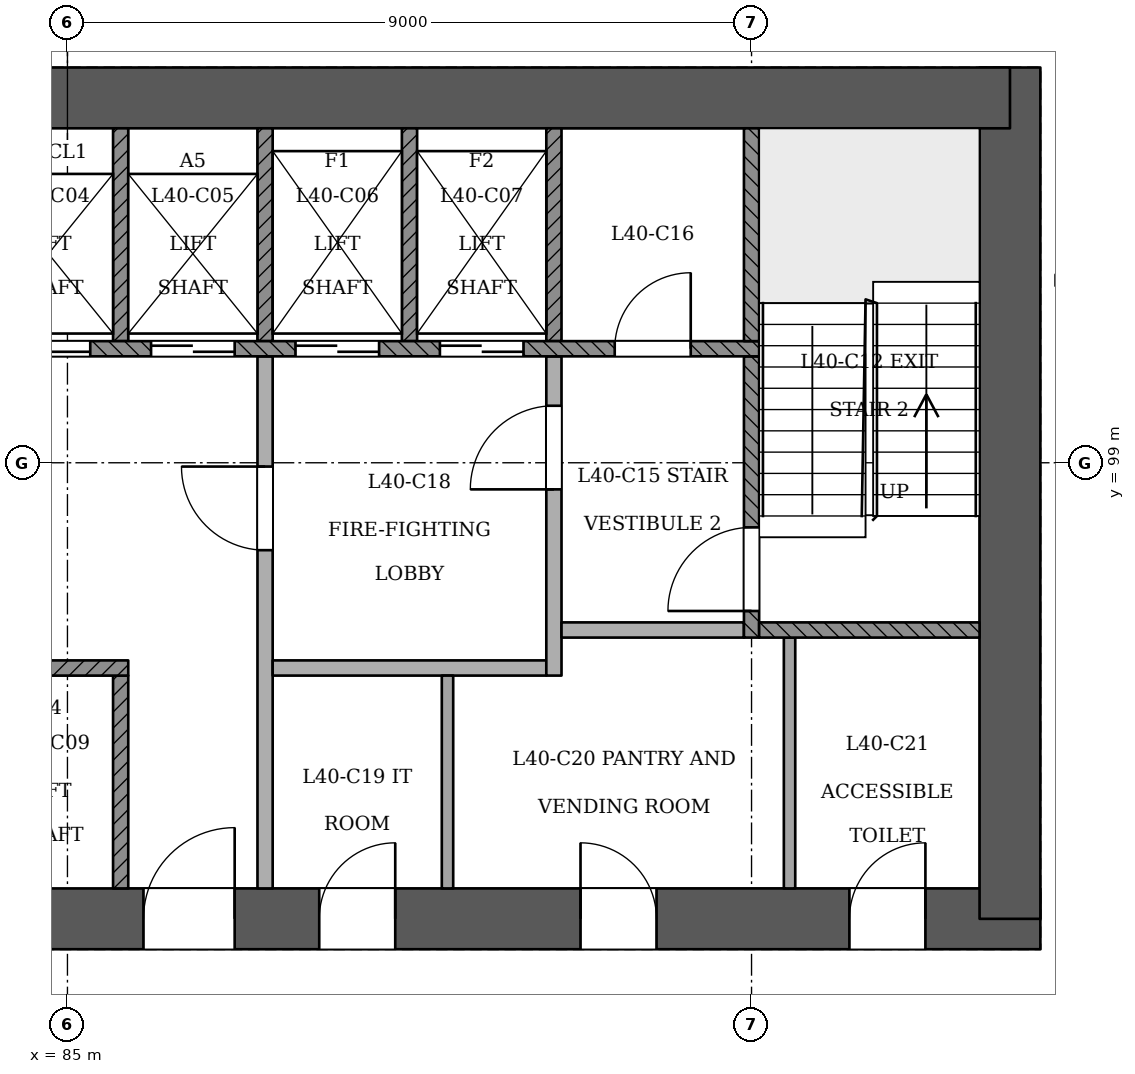
"""IFC4 building model, lengths in metres.
Left out: names, types, materials, properties, quantities, classifications, styles, units other than length and angle.
Written with IfcOpenShell. Run it as: python <this file> out.ifc"""

import sys

from ifc_helpers import new_model, si_unit, direction, frame, frame_2d, origin, place, context, subcontext, project, spatial, rectangle, extrude, element, fill, save


model = new_model("IFC4")
c1 = context("Model", 3, precision=1e-05, world=origin(), true_north=direction((0.0, 1.0)))
c2 = subcontext(c1, "Body", "Model", "MODEL_VIEW")
j1 = project(units=[si_unit("LENGTHUNIT", "METRE"), si_unit("PLANEANGLEUNIT", "RADIAN")], contexts=[c1])
p1 = place(None, origin())
s1 = spatial("IfcSite", under=j1, at=p1, CompositionType="ELEMENT")
p2 = place(p1, origin())
s2 = spatial("IfcBuilding", under=s1, at=p2, CompositionType="ELEMENT")
p3 = place(p2, frame((0.0, 0.0, 156.6)))
s3 = spatial("IfcBuildingStorey", under=s2, at=p3, CompositionType="ELEMENT", Elevation=156.6)
p4 = place(p3, frame((72.6, 93.0, 0.0), z_axis=(0.0, 0.0, 1.0), x_axis=(1.0, 0.0, 0.0)))
e1 = element("IfcWall", 1, at=p4, inside=s3, PredefinedType="SHEAR", context=c2, shape_type="SweptSolid", body=[
    extrude(rectangle(XDim=25.2, YDim=0.8, at=frame_2d((12.6, 0.0))), origin(), (0.0, 0.0, 1.0), 3.6),
])
p5 = place(p4, frame((1.2, 0.0, 0.0)))
e2 = element("IfcOpeningElement", 2, at=p5, cuts=e1, PredefinedType="OPENING", context=c2, shape_type="SweptSolid", body=[
    extrude(rectangle(XDim=1.2, YDim=2.1, at=frame_2d((0.6, 1.05))), frame((0.0, 0.411, 0.0), z_axis=(0.0, -1.0, 0.0), x_axis=(1.0, 0.0, 0.0)), (0.0, 0.0, 1.0), 0.821),
])
p6 = place(p4, frame((3.4, 0.0, 0.0)))
e3 = element("IfcOpeningElement", 3, at=p6, cuts=e1, PredefinedType="OPENING", context=c2, shape_type="SweptSolid", body=[
    extrude(rectangle(XDim=1.2, YDim=2.1, at=frame_2d((0.6, 1.05))), frame((0.0, 0.411, 0.0), z_axis=(0.0, -1.0, 0.0), x_axis=(1.0, 0.0, 0.0)), (0.0, 0.0, 1.0), 0.821),
])
p7 = place(p4, frame((13.4, 0.0, 0.0)))
e4 = element("IfcOpeningElement", 4, at=p7, cuts=e1, PredefinedType="OPENING", context=c2, shape_type="SweptSolid", body=[
    extrude(rectangle(XDim=1.2, YDim=2.1, at=frame_2d((0.6, 1.05))), frame((0.0, 0.411, 0.0), z_axis=(0.0, -1.0, 0.0), x_axis=(1.0, 0.0, 0.0)), (0.0, 0.0, 1.0), 0.821),
])
p8 = place(p4, frame((15.712, 0.0, 0.0)))
e5 = element("IfcOpeningElement", 5, at=p8, cuts=e1, PredefinedType="OPENING", context=c2, shape_type="SweptSolid", body=[
    extrude(rectangle(XDim=1.0, YDim=2.1, at=frame_2d((0.5, 1.05))), frame((0.0, 0.411, 0.0), z_axis=(0.0, -1.0, 0.0), x_axis=(1.0, 0.0, 0.0)), (0.0, 0.0, 1.0), 0.821),
])
p9 = place(p4, frame((19.15, 0.0, 0.0)))
e6 = element("IfcOpeningElement", 6, at=p9, cuts=e1, PredefinedType="OPENING", context=c2, shape_type="SweptSolid", body=[
    extrude(rectangle(XDim=1.0, YDim=2.1, at=frame_2d((0.5, 1.05))), frame((0.0, 0.411, 0.0), z_axis=(0.0, -1.0, 0.0), x_axis=(1.0, 0.0, 0.0)), (0.0, 0.0, 1.0), 0.821),
])
p10 = place(p4, frame((22.688, 0.0, 0.0)))
e7 = element("IfcOpeningElement", 7, at=p10, cuts=e1, PredefinedType="OPENING", context=c2, shape_type="SweptSolid", body=[
    extrude(rectangle(XDim=1.0, YDim=2.1, at=frame_2d((0.5, 1.05))), frame((0.0, 0.411, 0.0), z_axis=(0.0, -1.0, 0.0), x_axis=(1.0, 0.0, 0.0)), (0.0, 0.0, 1.0), 0.821),
])
p11 = place(p3, frame((97.4, 93.0, 0.0), z_axis=(0.0, 0.0, 1.0), x_axis=(0.0, 1.0, 0.0)))
e8 = element("IfcWall", 8, at=p11, inside=s3, PredefinedType="SHEAR", context=c2, shape_type="SweptSolid", body=[
    extrude(rectangle(XDim=11.2, YDim=0.8, at=frame_2d((5.6, 0.0))), origin(), (0.0, 0.0, 1.0), 3.6),
])
p12 = place(p3, frame((97.4, 103.8, 0.0), z_axis=(0.0, 0.0, 1.0), x_axis=(-1.0, 0.0, 0.0)))
e9 = element("IfcWall", 9, at=p12, inside=s3, PredefinedType="SHEAR", context=c2, shape_type="SweptSolid", body=[
    extrude(rectangle(XDim=25.2, YDim=0.8, at=frame_2d((12.6, 0.0))), origin(), (0.0, 0.0, 1.0), 3.6),
])
p13 = place(p3, frame((66.322, 97.326, 0.0), z_axis=(0.0, 0.0, 1.0), x_axis=(0.4999994764, -0.866025706085, 0.0)))
e10 = element("IfcWall", 10, at=p13, inside=s3, PredefinedType="PARTITIONING", context=c2, shape_type="SweptSolid", body=[
    extrude(rectangle(XDim=37.355, YDim=0.15, at=frame_2d((18.678, 0.0))), origin(), (0.0, 0.0, 1.0), 2.75),
])
p14 = place(p13, frame((2.8, 0.0, 0.0)))
e11 = element("IfcOpeningElement", 11, at=p14, cuts=e10, PredefinedType="OPENING", context=c2, shape_type="SweptSolid", body=[
    extrude(rectangle(XDim=1.2, YDim=2.1, at=frame_2d((0.6, 1.05))), frame((0.0, 0.085, 0.0), z_axis=(0.0, -1.0, 0.0), x_axis=(1.0, 0.0, 0.0)), (0.0, 0.0, 1.0), 0.171),
])
p15 = place(p13, frame((11.8, 0.0, 0.0)))
e12 = element("IfcOpeningElement", 12, at=p15, cuts=e10, PredefinedType="OPENING", context=c2, shape_type="SweptSolid", body=[
    extrude(rectangle(XDim=1.2, YDim=2.1, at=frame_2d((0.6, 1.05))), frame((0.0, 0.085, 0.0), z_axis=(0.0, -1.0, 0.0), x_axis=(1.0, 0.0, 0.0)), (0.0, 0.0, 1.0), 0.171),
])
p16 = place(p13, frame((24.15, 0.0, 0.0)))
e13 = element("IfcOpeningElement", 13, at=p16, cuts=e10, PredefinedType="OPENING", context=c2, shape_type="SweptSolid", body=[
    extrude(rectangle(XDim=1.2, YDim=2.1, at=frame_2d((0.6, 1.05))), frame((0.0, 0.085, 0.0), z_axis=(0.0, -1.0, 0.0), x_axis=(1.0, 0.0, 0.0)), (0.0, 0.0, 1.0), 0.171),
])
p17 = place(p13, frame((33.25, 0.0, 0.0)))
e14 = element("IfcOpeningElement", 14, at=p17, cuts=e10, PredefinedType="OPENING", context=c2, shape_type="SweptSolid", body=[
    extrude(rectangle(XDim=1.0, YDim=2.1, at=frame_2d((0.5, 1.05))), frame((0.0, 0.085, 0.0), z_axis=(0.0, -1.0, 0.0), x_axis=(1.0, 0.0, 0.0)), (0.0, 0.0, 1.0), 0.171),
])
p18 = place(p3, frame((85.065, 65.088, 0.0), z_axis=(0.0, 0.0, 1.0), x_axis=(0.500000254076, 0.866025257093, 0.0)))
e15 = element("IfcWall", 15, at=p18, inside=s3, PredefinedType="PARTITIONING", context=c2, shape_type="SweptSolid", body=[
    extrude(rectangle(XDim=37.226, YDim=0.15, at=frame_2d((18.613, 0.0))), origin(), (0.0, 0.0, 1.0), 2.75),
])
p19 = place(p18, frame((0.542, 0.0, 0.0)))
e16 = element("IfcOpeningElement", 16, at=p19, cuts=e15, PredefinedType="OPENING", context=c2, shape_type="SweptSolid", body=[
    extrude(rectangle(XDim=1.2, YDim=2.1, at=frame_2d((0.6, 1.05))), frame((0.0, 0.085, 0.0), z_axis=(0.0, -1.0, 0.0), x_axis=(1.0, 0.0, 0.0)), (0.0, 0.0, 1.0), 0.171),
])
p20 = place(p18, frame((11.876, 0.0, 0.0)))
e17 = element("IfcOpeningElement", 17, at=p20, cuts=e15, PredefinedType="OPENING", context=c2, shape_type="SweptSolid", body=[
    extrude(rectangle(XDim=1.2, YDim=2.1, at=frame_2d((0.6, 1.05))), frame((0.0, 0.085, 0.0), z_axis=(0.0, -1.0, 0.0), x_axis=(1.0, 0.0, 0.0)), (0.0, 0.0, 1.0), 0.171),
])
p21 = place(p18, frame((22.026, 0.0, 0.0)))
e18 = element("IfcOpeningElement", 18, at=p21, cuts=e15, PredefinedType="OPENING", context=c2, shape_type="SweptSolid", body=[
    extrude(rectangle(XDim=1.2, YDim=2.1, at=frame_2d((0.6, 1.05))), frame((0.0, 0.085, 0.0), z_axis=(0.0, -1.0, 0.0), x_axis=(1.0, 0.0, 0.0)), (0.0, 0.0, 1.0), 0.171),
])
p22 = place(p18, frame((31.026, 0.0, 0.0)))
e19 = element("IfcOpeningElement", 19, at=p22, cuts=e15, PredefinedType="OPENING", context=c2, shape_type="SweptSolid", body=[
    extrude(rectangle(XDim=1.2, YDim=2.1, at=frame_2d((0.6, 1.05))), frame((0.0, 0.085, 0.0), z_axis=(0.0, -1.0, 0.0), x_axis=(1.0, 0.0, 0.0)), (0.0, 0.0, 1.0), 0.171),
])
p23 = place(p3, frame((99.726, 101.4, 0.0), z_axis=(0.0, 0.0, 1.0), x_axis=(-0.999999909973, 0.000424328109, 0.0)))
e20 = element("IfcWall", 20, at=p23, inside=s3, PredefinedType="PARTITIONING", context=c2, shape_type="SweptSolid", body=[
    extrude(rectangle(XDim=1.726, YDim=0.15, at=frame_2d((0.863, 0.0))), origin(), (0.0, 0.0, 1.0), 3.15),
])
p24 = place(p3, frame((85.7, 93.4, 0.0), z_axis=(0.0, 0.0, 1.0), x_axis=(0.0, 1.0, 0.0)))
e21 = element("IfcWall", 21, at=p24, inside=s3, PredefinedType="SOLIDWALL", context=c2, shape_type="SweptSolid", body=[
    extrude(rectangle(XDim=2.8, YDim=0.2, at=frame_2d((1.4, 0.0))), origin(), (0.0, 0.0, 1.0), 3.15),
])
p25 = place(p3, frame((87.6, 93.4, 0.0), z_axis=(0.0, 0.0, 1.0), x_axis=(0.0, 1.0, 0.0)))
e22 = element("IfcWall", 22, at=p25, inside=s3, PredefinedType="PARTITIONING", context=c2, shape_type="SweptSolid", body=[
    extrude(rectangle(XDim=7.0, YDim=0.2, at=frame_2d((3.5, 0.0))), origin(), (0.0, 0.0, 1.0), 3.15),
])
p26 = place(p25, frame((4.45, 0.0, 0.0)))
e23 = element("IfcOpeningElement", 23, at=p26, cuts=e22, PredefinedType="OPENING", context=c2, shape_type="SweptSolid", body=[
    extrude(rectangle(XDim=1.1, YDim=2.1, at=frame_2d((0.55, 1.05))), frame((0.0, 0.11, 0.0), z_axis=(0.0, -1.0, 0.0), x_axis=(1.0, 0.0, 0.0)), (0.0, 0.0, 1.0), 0.221),
])
p27 = place(p3, frame((90.0, 93.4, 0.0), z_axis=(0.0, 0.0, 1.0), x_axis=(0.0, 1.0, 0.0)))
e24 = element("IfcWall", 24, at=p27, inside=s3, PredefinedType="PARTITIONING", context=c2, shape_type="SweptSolid", body=[
    extrude(rectangle(XDim=2.8, YDim=0.15, at=frame_2d((1.4, 0.0))), origin(), (0.0, 0.0, 1.0), 3.15),
])
p28 = place(p3, frame((94.5, 93.4, 0.0), z_axis=(0.0, 0.0, 1.0), x_axis=(0.0, 1.0, 0.0)))
e25 = element("IfcWall", 25, at=p28, inside=s3, PredefinedType="PARTITIONING", context=c2, shape_type="SweptSolid", body=[
    extrude(rectangle(XDim=3.3, YDim=0.15, at=frame_2d((1.65, 0.0))), origin(), (0.0, 0.0, 1.0), 3.15),
])
p29 = place(p3, frame((78.0, 96.3, 0.0), z_axis=(0.0, 0.0, 1.0), x_axis=(1.0, 0.0, 0.0)))
e26 = element("IfcWall", 26, at=p29, inside=s3, PredefinedType="SOLIDWALL", context=c2, shape_type="SweptSolid", body=[
    extrude(rectangle(XDim=7.8, YDim=0.2, at=frame_2d((3.9, 0.0))), origin(), (0.0, 0.0, 1.0), 3.15),
])
p30 = place(p29, frame((1.5, 0.0, 0.0)))
e27 = element("IfcOpeningElement", 27, at=p30, cuts=e26, PredefinedType="OPENING", context=c2, shape_type="SweptSolid", body=[
    extrude(rectangle(XDim=1.0, YDim=2.1, at=frame_2d((0.5, 1.05))), frame((0.0, 0.11, 0.0), z_axis=(0.0, -1.0, 0.0), x_axis=(1.0, 0.0, 0.0)), (0.0, 0.0, 1.0), 0.221),
])
p31 = place(p3, frame((87.7, 96.3, 0.0), z_axis=(0.0, 0.0, 1.0), x_axis=(1.0, 0.0, 0.0)))
e28 = element("IfcWall", 28, at=p31, inside=s3, PredefinedType="PARTITIONING", context=c2, shape_type="SweptSolid", body=[
    extrude(rectangle(XDim=3.6, YDim=0.2, at=frame_2d((1.8, 0.0))), origin(), (0.0, 0.0, 1.0), 3.15),
])
p32 = place(p3, frame((91.4, 96.2, 0.0), z_axis=(0.0, 0.0, 1.0), x_axis=(0.0, 1.0, 0.0)))
e29 = element("IfcWall", 29, at=p32, inside=s3, PredefinedType="PARTITIONING", context=c2, shape_type="SweptSolid", body=[
    extrude(rectangle(XDim=4.2, YDim=0.2, at=frame_2d((2.1, 0.0))), origin(), (0.0, 0.0, 1.0), 3.15),
])
p33 = place(p32, frame((2.45, 0.0, 0.0)))
e30 = element("IfcOpeningElement", 30, at=p33, cuts=e29, PredefinedType="OPENING", context=c2, shape_type="SweptSolid", body=[
    extrude(rectangle(XDim=1.1, YDim=2.1, at=frame_2d((0.55, 1.05))), frame((0.0, 0.11, 0.0), z_axis=(0.0, -1.0, 0.0), x_axis=(1.0, 0.0, 0.0)), (0.0, 0.0, 1.0), 0.221),
])
p34 = place(p3, frame((91.5, 96.8, 0.0), z_axis=(0.0, 0.0, 1.0), x_axis=(1.0, 0.0, 0.0)))
e31 = element("IfcWall", 31, at=p34, inside=s3, PredefinedType="PARTITIONING", context=c2, shape_type="SweptSolid", body=[
    extrude(rectangle(XDim=2.4, YDim=0.2, at=frame_2d((1.2, 0.0))), origin(), (0.0, 0.0, 1.0), 3.15),
])
p35 = place(p3, frame((94.0, 96.7, 0.0), z_axis=(0.0, 0.0, 1.0), x_axis=(0.0, 1.0, 0.0)))
e32 = element("IfcWall", 32, at=p35, inside=s3, PredefinedType="SOLIDWALL", context=c2, shape_type="SweptSolid", body=[
    extrude(rectangle(XDim=3.7, YDim=0.2, at=frame_2d((1.85, 0.0))), origin(), (0.0, 0.0, 1.0), 3.15),
])
p36 = place(p35, frame((0.35, 0.0, 0.0)))
e33 = element("IfcOpeningElement", 33, at=p36, cuts=e32, PredefinedType="OPENING", context=c2, shape_type="SweptSolid", body=[
    extrude(rectangle(XDim=1.1, YDim=2.1, at=frame_2d((0.55, 1.05))), frame((0.0, 0.11, 0.0), z_axis=(0.0, -1.0, 0.0), x_axis=(1.0, 0.0, 0.0)), (0.0, 0.0, 1.0), 0.221),
])
p37 = place(p3, frame((94.1, 96.8, 0.0), z_axis=(0.0, 0.0, 1.0), x_axis=(1.0, 0.0, 0.0)))
e34 = element("IfcWall", 34, at=p37, inside=s3, PredefinedType="SOLIDWALL", context=c2, shape_type="SweptSolid", body=[
    extrude(rectangle(XDim=2.9, YDim=0.2, at=frame_2d((1.45, 0.0))), origin(), (0.0, 0.0, 1.0), 3.15),
])
p38 = place(p3, frame((75.9, 100.5, 0.0), z_axis=(0.0, 0.0, 1.0), x_axis=(1.0, 0.0, 0.0)))
e35 = element("IfcWall", 35, at=p38, inside=s3, PredefinedType="SOLIDWALL", context=c2, shape_type="SweptSolid", body=[
    extrude(rectangle(XDim=18.2, YDim=0.2, at=frame_2d((9.1, 0.0))), origin(), (0.0, 0.0, 1.0), 3.15),
])
p39 = place(p38, frame((2.6, 0.0, 0.0)))
e36 = element("IfcOpeningElement", 36, at=p39, cuts=e35, PredefinedType="OPENING", context=c2, shape_type="SweptSolid", body=[
    extrude(rectangle(XDim=1.1, YDim=2.1, at=frame_2d((0.55, 1.05))), frame((0.0, 0.11, 0.0), z_axis=(0.0, -1.0, 0.0), x_axis=(1.0, 0.0, 0.0)), (0.0, 0.0, 1.0), 0.221),
])
p40 = place(p38, frame((4.5, 0.0, 0.0)))
e37 = element("IfcOpeningElement", 37, at=p40, cuts=e35, PredefinedType="OPENING", context=c2, shape_type="SweptSolid", body=[
    extrude(rectangle(XDim=1.1, YDim=2.1, at=frame_2d((0.55, 1.05))), frame((0.0, 0.11, 0.0), z_axis=(0.0, -1.0, 0.0), x_axis=(1.0, 0.0, 0.0)), (0.0, 0.0, 1.0), 0.221),
])
p41 = place(p38, frame((6.4, 0.0, 0.0)))
e38 = element("IfcOpeningElement", 38, at=p41, cuts=e35, PredefinedType="OPENING", context=c2, shape_type="SweptSolid", body=[
    extrude(rectangle(XDim=1.1, YDim=2.1, at=frame_2d((0.55, 1.05))), frame((0.0, 0.11, 0.0), z_axis=(0.0, -1.0, 0.0), x_axis=(1.0, 0.0, 0.0)), (0.0, 0.0, 1.0), 0.221),
])
p42 = place(p38, frame((8.3, 0.0, 0.0)))
e39 = element("IfcOpeningElement", 39, at=p42, cuts=e35, PredefinedType="OPENING", context=c2, shape_type="SweptSolid", body=[
    extrude(rectangle(XDim=1.1, YDim=2.1, at=frame_2d((0.55, 1.05))), frame((0.0, 0.11, 0.0), z_axis=(0.0, -1.0, 0.0), x_axis=(1.0, 0.0, 0.0)), (0.0, 0.0, 1.0), 0.221),
])
p43 = place(p38, frame((10.2, 0.0, 0.0)))
e40 = element("IfcOpeningElement", 40, at=p43, cuts=e35, PredefinedType="OPENING", context=c2, shape_type="SweptSolid", body=[
    extrude(rectangle(XDim=1.1, YDim=2.1, at=frame_2d((0.55, 1.05))), frame((0.0, 0.11, 0.0), z_axis=(0.0, -1.0, 0.0), x_axis=(1.0, 0.0, 0.0)), (0.0, 0.0, 1.0), 0.221),
])
p44 = place(p38, frame((12.1, 0.0, 0.0)))
e41 = element("IfcOpeningElement", 41, at=p44, cuts=e35, PredefinedType="OPENING", context=c2, shape_type="SweptSolid", body=[
    extrude(rectangle(XDim=1.1, YDim=2.1, at=frame_2d((0.55, 1.05))), frame((0.0, 0.11, 0.0), z_axis=(0.0, -1.0, 0.0), x_axis=(1.0, 0.0, 0.0)), (0.0, 0.0, 1.0), 0.221),
])
p45 = place(p38, frame((14.0, 0.0, 0.0)))
e42 = element("IfcOpeningElement", 42, at=p45, cuts=e35, PredefinedType="OPENING", context=c2, shape_type="SweptSolid", body=[
    extrude(rectangle(XDim=1.1, YDim=2.1, at=frame_2d((0.55, 1.05))), frame((0.0, 0.11, 0.0), z_axis=(0.0, -1.0, 0.0), x_axis=(1.0, 0.0, 0.0)), (0.0, 0.0, 1.0), 0.221),
])
p46 = place(p38, frame((0.65, 0.0, 0.0)))
e43 = element("IfcOpeningElement", 43, at=p46, cuts=e35, PredefinedType="OPENING", context=c2, shape_type="SweptSolid", body=[
    extrude(rectangle(XDim=1.0, YDim=2.1, at=frame_2d((0.5, 1.05))), frame((0.0, 0.11, 0.0), z_axis=(0.0, -1.0, 0.0), x_axis=(1.0, 0.0, 0.0)), (0.0, 0.0, 1.0), 0.221),
])
p47 = place(p38, frame((16.3, 0.0, 0.0)))
e44 = element("IfcOpeningElement", 44, at=p47, cuts=e35, PredefinedType="OPENING", context=c2, shape_type="SweptSolid", body=[
    extrude(rectangle(XDim=1.0, YDim=2.1, at=frame_2d((0.5, 1.05))), frame((0.0, 0.11, 0.0), z_axis=(0.0, -1.0, 0.0), x_axis=(1.0, 0.0, 0.0)), (0.0, 0.0, 1.0), 0.221),
])
for number, where, z_axis, x_axis in (
    (45, (85.7, 100.6, 0.0), (0.0, 0.0, 1.0), (0.0, 1.0, 0.0)),
    (46, (87.6, 100.6, 0.0), (0.0, 0.0, 1.0), (0.0, 1.0, 0.0)),
    (47, (89.5, 100.6, 0.0), (0.0, 0.0, 1.0), (0.0, 1.0, 0.0)),
    (48, (91.4, 100.6, 0.0), (0.0, 0.0, 1.0), (0.0, 1.0, 0.0)),
    (49, (94.0, 100.6, 0.0), (0.0, 0.0, 1.0), (0.0, 1.0, 0.0)),
):
    element("IfcWall", number, at=place(p3, frame(where, z_axis=z_axis, x_axis=x_axis)), inside=s3, PredefinedType="SOLIDWALL", context=c2, shape_type="SweptSolid", body=[
        extrude(rectangle(XDim=2.8, YDim=0.2, at=frame_2d((1.4, 0.0))), origin(), (0.0, 0.0, 1.0), 3.15),
    ])
p48 = place(p42, origin())
e50 = element("IfcDoor", 50, at=p48, inside=s3, OperationType="SLIDING_TO_LEFT", PredefinedType="NOTDEFINED", context=c2, shape_type="SweptSolid", body=[
    extrude(rectangle(XDim=1.1, YDim=2.1, at=frame_2d((0.55, 1.05))), frame((0.0, 0.025, 0.0), z_axis=(0.0, -1.0, 0.0), x_axis=(1.0, 0.0, 0.0)), (0.0, 0.0, 1.0), 0.05),
])
fill(e39, e50)
p49 = place(p43, origin())
e51 = element("IfcDoor", 51, at=p49, inside=s3, OperationType="SLIDING_TO_RIGHT", PredefinedType="NOTDEFINED", context=c2, shape_type="SweptSolid", body=[
    extrude(rectangle(XDim=1.1, YDim=2.1, at=frame_2d((0.55, 1.05))), frame((0.0, 0.025, 0.0), z_axis=(0.0, -1.0, 0.0), x_axis=(1.0, 0.0, 0.0)), (0.0, 0.0, 1.0), 0.05),
])
fill(e40, e51)
p50 = place(p44, origin())
e52 = element("IfcDoor", 52, at=p50, inside=s3, OperationType="SLIDING_TO_RIGHT", PredefinedType="NOTDEFINED", context=c2, shape_type="SweptSolid", body=[
    extrude(rectangle(XDim=1.1, YDim=2.1, at=frame_2d((0.55, 1.05))), frame((0.0, 0.025, 0.0), z_axis=(0.0, -1.0, 0.0), x_axis=(1.0, 0.0, 0.0)), (0.0, 0.0, 1.0), 0.05),
])
fill(e41, e52)
p51 = place(p45, origin())
e53 = element("IfcDoor", 53, at=p51, inside=s3, OperationType="SLIDING_TO_LEFT", PredefinedType="NOTDEFINED", context=c2, shape_type="SweptSolid", body=[
    extrude(rectangle(XDim=1.1, YDim=2.1, at=frame_2d((0.55, 1.05))), frame((0.0, 0.025, 0.0), z_axis=(0.0, -1.0, 0.0), x_axis=(1.0, 0.0, 0.0)), (0.0, 0.0, 1.0), 0.05),
])
fill(e42, e53)
p52 = place(p36, origin())
e54 = element("IfcDoor", 54, at=p52, inside=s3, OperationType="SINGLE_SWING_LEFT", PredefinedType="NOTDEFINED", context=c2, shape_type="SweptSolid", body=[
    extrude(rectangle(XDim=1.1, YDim=2.1, at=frame_2d((0.55, 1.05))), frame((0.0, 0.025, 0.0), z_axis=(0.0, -1.0, 0.0), x_axis=(1.0, 0.0, 0.0)), (0.0, 0.0, 1.0), 0.05),
])
fill(e33, e54)
p53 = place(p26, origin())
e55 = element("IfcDoor", 55, at=p53, inside=s3, OperationType="SINGLE_SWING_RIGHT", PredefinedType="NOTDEFINED", context=c2, shape_type="SweptSolid", body=[
    extrude(rectangle(XDim=1.1, YDim=2.1, at=frame_2d((0.55, 1.05))), frame((0.0, 0.025, 0.0), z_axis=(0.0, -1.0, 0.0), x_axis=(1.0, 0.0, 0.0)), (0.0, 0.0, 1.0), 0.05),
])
fill(e23, e55)
p54 = place(p33, origin())
e56 = element("IfcDoor", 56, at=p54, inside=s3, OperationType="SINGLE_SWING_LEFT", PredefinedType="NOTDEFINED", context=c2, shape_type="SweptSolid", body=[
    extrude(rectangle(XDim=1.1, YDim=2.1, at=frame_2d((0.55, 1.05))), frame((0.0, 0.025, 0.0), z_axis=(0.0, -1.0, 0.0), x_axis=(1.0, 0.0, 0.0)), (0.0, 0.0, 1.0), 0.05),
])
fill(e30, e56)
p55 = place(p7, origin())
e57 = element("IfcDoor", 57, at=p55, inside=s3, OperationType="SINGLE_SWING_RIGHT", PredefinedType="NOTDEFINED", context=c2, shape_type="SweptSolid", body=[
    extrude(rectangle(XDim=1.2, YDim=2.1, at=frame_2d((0.6, 1.05))), frame((0.0, 0.025, 0.0), z_axis=(0.0, -1.0, 0.0), x_axis=(1.0, 0.0, 0.0)), (0.0, 0.0, 1.0), 0.05),
])
fill(e4, e57)
p56 = place(p47, origin())
e58 = element("IfcDoor", 58, at=p56, inside=s3, OperationType="SINGLE_SWING_RIGHT", PredefinedType="NOTDEFINED", context=c2, shape_type="SweptSolid", body=[
    extrude(rectangle(XDim=1.0, YDim=2.1, at=frame_2d((0.5, 1.05))), frame((0.0, 0.025, 0.0), z_axis=(0.0, -1.0, 0.0), x_axis=(1.0, 0.0, 0.0)), (0.0, 0.0, 1.0), 0.05),
])
fill(e44, e58)
p57 = place(p8, origin())
e59 = element("IfcDoor", 59, at=p57, inside=s3, OperationType="SINGLE_SWING_RIGHT", PredefinedType="NOTDEFINED", context=c2, shape_type="SweptSolid", body=[
    extrude(rectangle(XDim=1.0, YDim=2.1, at=frame_2d((0.5, 1.05))), frame((0.0, 0.025, 0.0), z_axis=(0.0, -1.0, 0.0), x_axis=(1.0, 0.0, 0.0)), (0.0, 0.0, 1.0), 0.05),
])
fill(e5, e59)
p58 = place(p9, origin())
e60 = element("IfcDoor", 60, at=p58, inside=s3, OperationType="SINGLE_SWING_LEFT", PredefinedType="NOTDEFINED", context=c2, shape_type="SweptSolid", body=[
    extrude(rectangle(XDim=1.0, YDim=2.1, at=frame_2d((0.5, 1.05))), frame((0.0, 0.025, 0.0), z_axis=(0.0, -1.0, 0.0), x_axis=(1.0, 0.0, 0.0)), (0.0, 0.0, 1.0), 0.05),
])
fill(e6, e60)
p59 = place(p10, origin())
e61 = element("IfcDoor", 61, at=p59, inside=s3, OperationType="SINGLE_SWING_RIGHT", PredefinedType="NOTDEFINED", context=c2, shape_type="SweptSolid", body=[
    extrude(rectangle(XDim=1.0, YDim=2.1, at=frame_2d((0.5, 1.05))), frame((0.0, 0.025, 0.0), z_axis=(0.0, -1.0, 0.0), x_axis=(1.0, 0.0, 0.0)), (0.0, 0.0, 1.0), 0.05),
])
fill(e7, e61)
save(model, sys.argv[1])
